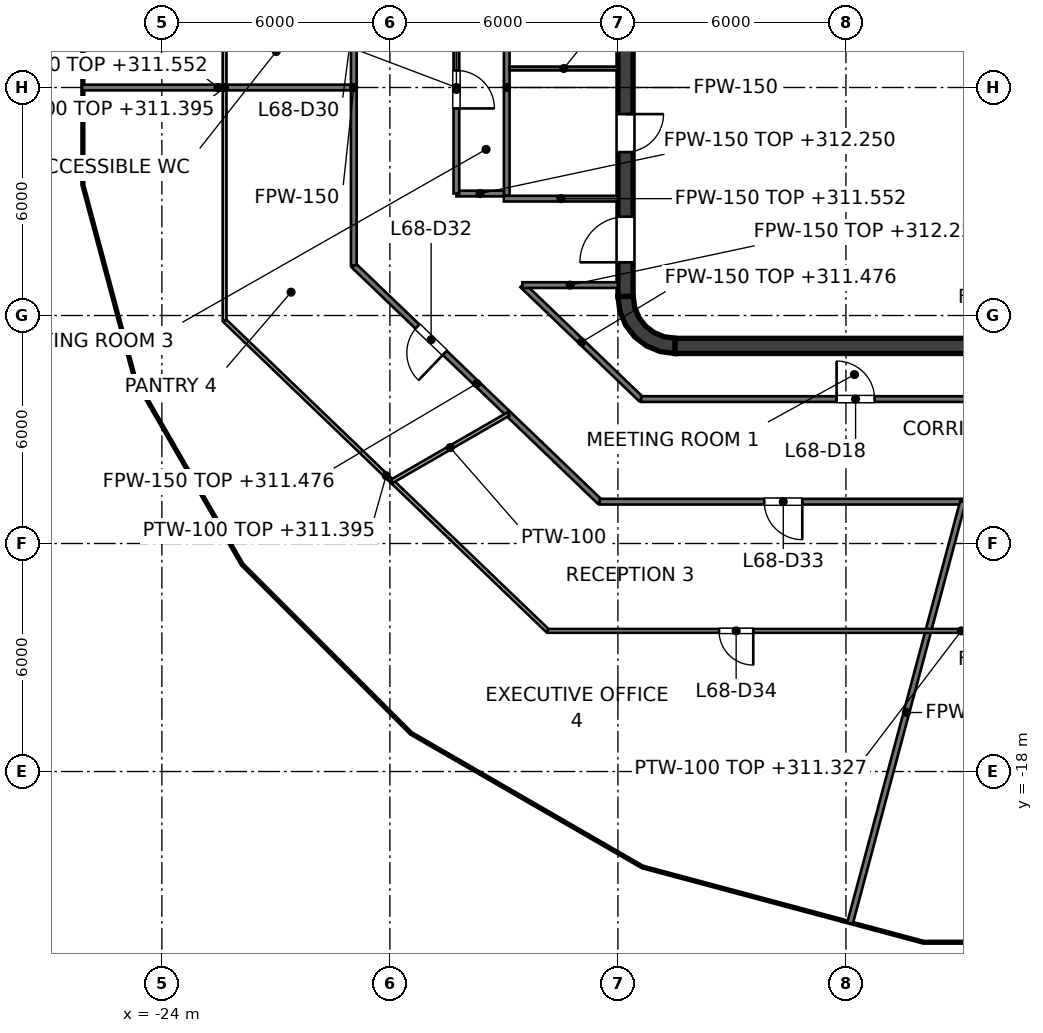
"""IFC4 building model, lengths in metres.
Left out: names, types, materials, properties, quantities, classifications, styles, units other than length and angle.
Written with IfcOpenShell. Run it as: python <this file> out.ifc"""

import sys

from ifc_helpers import new_model, si_unit, direction, frame, frame_2d, origin, place, context, subcontext, project, spatial, polyline, rectangle, outline, extrude, element, fill, save


model = new_model("IFC4")
c1 = context("Model", 3, precision=1e-05, world=origin(), true_north=direction((0.0, 1.0)))
c2 = subcontext(c1, "Body", "Model", "MODEL_VIEW")
j1 = project(units=[si_unit("LENGTHUNIT", "METRE"), si_unit("PLANEANGLEUNIT", "RADIAN")], contexts=[c1])
p1 = place(None, origin())
s1 = spatial("IfcSite", under=j1, at=p1, CompositionType="ELEMENT")
p2 = place(p1, origin())
s2 = spatial("IfcBuilding", under=s1, at=p2, CompositionType="ELEMENT")
p3 = place(p2, frame((0.0, 0.0, 308.4)))
s3 = spatial("IfcBuildingStorey", under=s2, at=p3, CompositionType="ELEMENT", Elevation=308.4)
p4 = place(p3, frame((-10.5, -6.8, 0.0), z_axis=(0.0, 0.0, 1.0), x_axis=(1.0, 0.0, 0.0)))
e1 = element("IfcWall", 1, at=p4, inside=s3, PredefinedType="SHEAR", context=c2, shape_type="SweptSolid", body=[
    extrude(rectangle(XDim=21.0, YDim=0.4, at=frame_2d((10.5, 0.0))), origin(), (0.0, 0.0, 1.0), 4.0),
])
p5 = place(p3, frame((-11.8, -5.5, 0.0), z_axis=(0.0, 0.0, 1.0), x_axis=(0.0, 1.0, 0.0)))
e2 = element("IfcWall", 2, at=p5, inside=s3, PredefinedType="SHEAR", context=c2, shape_type="SweptSolid", body=[
    extrude(rectangle(XDim=11.0, YDim=0.4, at=frame_2d((5.5, 0.0))), origin(), (0.0, 0.0, 1.0), 4.0),
])
p6 = place(p5, frame((3.8, 0.0, 0.0)))
e3 = element("IfcOpeningElement", 3, at=p6, cuts=e2, PredefinedType="OPENING", context=c2, shape_type="SweptSolid", body=[
    extrude(rectangle(XDim=1.0, YDim=2.1, at=frame_2d((0.5, 1.05))), frame((0.0, 0.2, 0.0), z_axis=(0.0, -1.0, 0.0), x_axis=(1.0, 0.0, 0.0)), (0.0, 0.0, 1.0), 0.4),
])
p7 = place(p5, frame((6.7, 0.0, 0.0)))
e4 = element("IfcOpeningElement", 4, at=p7, cuts=e2, PredefinedType="OPENING", context=c2, shape_type="SweptSolid", body=[
    extrude(rectangle(XDim=1.0, YDim=2.1, at=frame_2d((0.5, 1.05))), frame((0.0, 0.2, 0.0), z_axis=(0.0, -1.0, 0.0), x_axis=(1.0, 0.0, 0.0)), (0.0, 0.0, 1.0), 0.4),
])
p8 = place(p5, frame((0.9, 0.0, 0.0)))
e5 = element("IfcOpeningElement", 5, at=p8, cuts=e2, PredefinedType="OPENING", context=c2, shape_type="SweptSolid", body=[
    extrude(rectangle(XDim=1.2, YDim=2.1, at=frame_2d((0.6, 1.05))), frame((0.0, 0.2, 0.0), z_axis=(0.0, -1.0, 0.0), x_axis=(1.0, 0.0, 0.0)), (0.0, 0.0, 1.0), 0.4),
])
p9 = place(p5, frame((8.9, 0.0, 0.0)))
e6 = element("IfcOpeningElement", 6, at=p9, cuts=e2, PredefinedType="OPENING", context=c2, shape_type="SweptSolid", body=[
    extrude(rectangle(XDim=1.2, YDim=2.1, at=frame_2d((0.6, 1.05))), frame((0.0, 0.2, 0.0), z_axis=(0.0, -1.0, 0.0), x_axis=(1.0, 0.0, 0.0)), (0.0, 0.0, 1.0), 0.4),
])
p10 = place(p3, origin())
e7 = element("IfcWall", 7, at=p10, inside=s3, PredefinedType="SHEAR", context=c2, shape_type="SweptSolid", body=[
    extrude(outline(polyline([(-10.5, -7.0), (-10.5, -6.596), (-10.784, -6.559), (-11.048, -6.45), (-11.275, -6.275), (-11.45, -6.048), (-11.559, -5.784), (-11.596, -5.5), (-12.0, -5.5), (-11.949, -5.888), (-11.799, -6.25), (-11.561, -6.561), (-11.25, -6.799), (-10.888, -6.949), (-10.5, -7.0)])), origin(), (0.0, 0.0, 1.0), 4.0),
])
p11 = place(p3, frame((-9.0, -6.6, 0.0), z_axis=(0.0, 0.0, 1.0), x_axis=(0.0, 1.0, 0.0)))
e8 = element("IfcWall", 8, at=p11, inside=s3, PredefinedType="PARTITIONING", context=c2, shape_type="SweptSolid", body=[
    extrude(rectangle(XDim=2.5, YDim=0.25, at=frame_2d((1.25, 0.0))), origin(), (0.0, 0.0, 1.0), 3.85),
])
p12 = place(p11, frame((0.75, 0.0, 0.0)))
e9 = element("IfcOpeningElement", 9, at=p12, cuts=e8, PredefinedType="OPENING", context=c2, shape_type="SweptSolid", body=[
    extrude(rectangle(XDim=1.0, YDim=2.1, at=frame_2d((0.5, 1.05))), frame((0.0, 0.125, 0.0), z_axis=(0.0, -1.0, 0.0), x_axis=(1.0, 0.0, 0.0)), (0.0, 0.0, 1.0), 0.25),
])
p13 = place(p3, frame((-2.9, -6.6, 0.0), z_axis=(0.0, 0.0, 1.0), x_axis=(0.0, 1.0, 0.0)))
e10 = element("IfcWall", 10, at=p13, inside=s3, PredefinedType="PARTITIONING", context=c2, shape_type="SweptSolid", body=[
    extrude(rectangle(XDim=2.5, YDim=0.25, at=frame_2d((1.25, 0.0))), origin(), (0.0, 0.0, 1.0), 3.85),
])
p14 = place(p13, frame((0.8, 0.0, 0.0)))
e11 = element("IfcOpeningElement", 11, at=p14, cuts=e10, PredefinedType="OPENING", context=c2, shape_type="SweptSolid", body=[
    extrude(rectangle(XDim=0.9, YDim=2.1, at=frame_2d((0.45, 1.05))), frame((0.0, 0.125, 0.0), z_axis=(0.0, -1.0, 0.0), x_axis=(1.0, 0.0, 0.0)), (0.0, 0.0, 1.0), 0.25),
])
p15 = place(p3, frame((-9.125, -1.525, 0.0), z_axis=(0.0, 0.0, 1.0), x_axis=(1.0, 0.0, 0.0)))
e12 = element("IfcWall", 12, at=p15, inside=s3, PredefinedType="SOLIDWALL", context=c2, shape_type="SweptSolid", body=[
    extrude(rectangle(XDim=18.25, YDim=0.25, at=frame_2d((9.125, 0.0))), origin(), (0.0, 0.0, 1.0), 3.85),
])
p16 = place(p15, frame((7.15, 0.0, 0.0)))
e13 = element("IfcOpeningElement", 13, at=p16, cuts=e12, PredefinedType="OPENING", context=c2, shape_type="SweptSolid", body=[
    extrude(rectangle(XDim=1.2, YDim=2.1, at=frame_2d((0.6, 1.05))), frame((0.0, 0.125, 0.0), z_axis=(0.0, -1.0, 0.0), x_axis=(1.0, 0.0, 0.0)), (0.0, 0.0, 1.0), 0.25),
])
p17 = place(p15, frame((10.2, 0.0, 0.0)))
e14 = element("IfcOpeningElement", 14, at=p17, cuts=e12, PredefinedType="OPENING", context=c2, shape_type="SweptSolid", body=[
    extrude(rectangle(XDim=1.2, YDim=2.1, at=frame_2d((0.6, 1.05))), frame((0.0, 0.125, 0.0), z_axis=(0.0, -1.0, 0.0), x_axis=(1.0, 0.0, 0.0)), (0.0, 0.0, 1.0), 0.25),
])
p18 = place(p15, frame((16.075, 0.0, 0.0)))
e15 = element("IfcOpeningElement", 15, at=p18, cuts=e12, PredefinedType="OPENING", context=c2, shape_type="SweptSolid", body=[
    extrude(rectangle(XDim=1.0, YDim=2.1, at=frame_2d((0.5, 1.05))), frame((0.0, 0.125, 0.0), z_axis=(0.0, -1.0, 0.0), x_axis=(1.0, 0.0, 0.0)), (0.0, 0.0, 1.0), 0.25),
])
p19 = place(p3, frame((-9.125, -3.975, 0.0), z_axis=(0.0, 0.0, 1.0), x_axis=(1.0, 0.0, 0.0)))
e16 = element("IfcWall", 16, at=p19, inside=s3, PredefinedType="SOLIDWALL", context=c2, shape_type="SweptSolid", body=[
    extrude(rectangle(XDim=12.4, YDim=0.25, at=frame_2d((6.2, 0.0))), origin(), (0.0, 0.0, 1.0), 3.85),
])
p20 = place(p19, frame((1.05, 0.0, 0.0)))
e17 = element("IfcOpeningElement", 17, at=p20, cuts=e16, PredefinedType="OPENING", context=c2, shape_type="SweptSolid", body=[
    extrude(rectangle(XDim=1.2, YDim=2.1, at=frame_2d((0.6, 1.05))), frame((0.0, 0.125, 0.0), z_axis=(0.0, -1.0, 0.0), x_axis=(1.0, 0.0, 0.0)), (0.0, 0.0, 1.0), 0.25),
])
p21 = place(p19, frame((4.1, 0.0, 0.0)))
e18 = element("IfcOpeningElement", 18, at=p21, cuts=e16, PredefinedType="OPENING", context=c2, shape_type="SweptSolid", body=[
    extrude(rectangle(XDim=1.2, YDim=2.1, at=frame_2d((0.6, 1.05))), frame((0.0, 0.125, 0.0), z_axis=(0.0, -1.0, 0.0), x_axis=(1.0, 0.0, 0.0)), (0.0, 0.0, 1.0), 0.25),
])
for number, where, z_axis, x_axis in (
    (19, (-9.0, -3.85, 0.0), (0.0, 0.0, 1.0), (0.0, 1.0, 0.0)),
    (20, (-5.95, -3.85, 0.0), (0.0, 0.0, 1.0), (0.0, 1.0, 0.0)),
    (21, (-2.9, -3.85, 0.0), (0.0, 0.0, 1.0), (0.0, 1.0, 0.0)),
):
    element("IfcWall", number, at=place(p3, frame(where, z_axis=z_axis, x_axis=x_axis)), inside=s3, PredefinedType="SOLIDWALL", context=c2, shape_type="SweptSolid", body=[
        extrude(rectangle(XDim=2.2, YDim=0.25, at=frame_2d((1.1, 0.0))), origin(), (0.0, 0.0, 1.0), 3.85),
    ])
p22 = place(p3, frame((-14.925, -2.85, 0.0), z_axis=(0.0, 0.0, 1.0), x_axis=(0.0, 1.0, 0.0)))
e22 = element("IfcWall", 22, at=p22, inside=s3, PredefinedType="PARTITIONING", context=c2, shape_type="SweptSolid", body=[
    extrude(rectangle(XDim=5.7, YDim=0.15, at=frame_2d((2.85, 0.0))), origin(), (0.0, 0.0, 1.0), 2.995),
])
p23 = place(p3, frame((-15.0, -2.925, 0.0), z_axis=(0.0, 0.0, 1.0), x_axis=(1.0, 0.0, 0.0)))
e23 = element("IfcWall", 23, at=p23, inside=s3, PredefinedType="PARTITIONING", context=c2, shape_type="SweptSolid", body=[
    extrude(rectangle(XDim=3.0, YDim=0.15, at=frame_2d((1.5, 0.0))), origin(), (0.0, 0.0, 1.0), 3.152),
])
p24 = place(p3, frame((-14.85, 0.5, 0.0), z_axis=(0.0, 0.0, 1.0), x_axis=(1.0, 0.0, 0.0)))
e24 = element("IfcWall", 24, at=p24, inside=s3, PredefinedType="PARTITIONING", context=c2, shape_type="SweptSolid", body=[
    extrude(rectangle(XDim=2.85, YDim=0.1, at=frame_2d((1.425, 0.0))), origin(), (0.0, 0.0, 1.0), 3.85),
])
p25 = place(p3, frame((-18.95, -4.683, 0.0), z_axis=(0.0, 0.0, 1.0), x_axis=(0.721259541977, -0.692664906797, 0.0)))
e25 = element("IfcWall", 25, at=p25, inside=s3, PredefinedType="PARTITIONING", context=c2, shape_type="SweptSolid", body=[
    extrude(rectangle(XDim=8.973, YDim=0.15, at=frame_2d((4.487, 0.0))), origin(), (0.0, 0.0, 1.0), 3.076),
])
p26 = place(p25, frame((2.321, 0.0, 0.0)))
e26 = element("IfcOpeningElement", 26, at=p26, cuts=e25, PredefinedType="OPENING", context=c2, shape_type="SweptSolid", body=[
    extrude(rectangle(XDim=1.0, YDim=2.1, at=frame_2d((0.5, 1.05))), frame((0.0, 0.075, 0.0), z_axis=(0.0, -1.0, 0.0), x_axis=(1.0, 0.0, 0.0)), (0.0, 0.0, 1.0), 0.15),
])
p27 = place(p3, frame((-14.514, -5.2, 0.0), z_axis=(0.0, 0.0, 1.0), x_axis=(0.721228427004, -0.692697304803, 0.0)))
e27 = element("IfcWall", 27, at=p27, inside=s3, PredefinedType="PARTITIONING", context=c2, shape_type="SweptSolid", body=[
    extrude(rectangle(XDim=4.33, YDim=0.15, at=frame_2d((2.165, 0.0))), origin(), (0.0, 0.0, 1.0), 3.076),
])
p28 = place(p3, frame((-12.478, -10.899, 0.0), z_axis=(0.0, 0.0, 1.0), x_axis=(1.0, 0.0, 0.0)))
e28 = element("IfcWall", 28, at=p28, inside=s3, PredefinedType="PARTITIONING", context=c2, shape_type="SweptSolid", body=[
    extrude(rectangle(XDim=24.956, YDim=0.15, at=frame_2d((12.478, 0.0))), origin(), (0.0, 0.0, 1.0), 2.927),
])
p29 = place(p28, frame((4.329, 0.0, 0.0)))
e29 = element("IfcOpeningElement", 29, at=p29, cuts=e28, PredefinedType="OPENING", context=c2, shape_type="SweptSolid", body=[
    extrude(rectangle(XDim=1.0, YDim=2.1, at=frame_2d((0.5, 1.05))), frame((0.0, 0.075, 0.0), z_axis=(0.0, -1.0, 0.0), x_axis=(1.0, 0.0, 0.0)), (0.0, 0.0, 1.0), 0.15),
])
p30 = place(p28, frame((11.978, 0.0, 0.0)))
e30 = element("IfcOpeningElement", 30, at=p30, cuts=e28, PredefinedType="OPENING", context=c2, shape_type="SweptSolid", body=[
    extrude(rectangle(XDim=1.0, YDim=2.1, at=frame_2d((0.5, 1.05))), frame((0.0, 0.075, 0.0), z_axis=(0.0, -1.0, 0.0), x_axis=(1.0, 0.0, 0.0)), (0.0, 0.0, 1.0), 0.15),
])
p31 = place(p28, frame((19.627, 0.0, 0.0)))
e31 = element("IfcOpeningElement", 31, at=p31, cuts=e28, PredefinedType="OPENING", context=c2, shape_type="SweptSolid", body=[
    extrude(rectangle(XDim=1.0, YDim=2.1, at=frame_2d((0.5, 1.05))), frame((0.0, 0.075, 0.0), z_axis=(0.0, -1.0, 0.0), x_axis=(1.0, 0.0, 0.0)), (0.0, 0.0, 1.0), 0.15),
])
p32 = place(p3, frame((-11.391, -8.199, 0.0), z_axis=(0.0, 0.0, 1.0), x_axis=(1.0, 0.0, 0.0)))
e32 = element("IfcWall", 32, at=p32, inside=s3, PredefinedType="PARTITIONING", context=c2, shape_type="SweptSolid", body=[
    extrude(rectangle(XDim=22.782, YDim=0.15, at=frame_2d((11.391, 0.0))), origin(), (0.0, 0.0, 1.0), 2.927),
])
p33 = place(p32, frame((5.145, 0.0, 0.0)))
e33 = element("IfcOpeningElement", 33, at=p33, cuts=e32, PredefinedType="OPENING", context=c2, shape_type="SweptSolid", body=[
    extrude(rectangle(XDim=1.0, YDim=2.1, at=frame_2d((0.5, 1.05))), frame((0.0, 0.075, 0.0), z_axis=(0.0, -1.0, 0.0), x_axis=(1.0, 0.0, 0.0)), (0.0, 0.0, 1.0), 0.15),
])
p34 = place(p32, frame((16.536, 0.0, 0.0)))
e34 = element("IfcOpeningElement", 34, at=p34, cuts=e32, PredefinedType="OPENING", context=c2, shape_type="SweptSolid", body=[
    extrude(rectangle(XDim=1.0, YDim=2.1, at=frame_2d((0.5, 1.05))), frame((0.0, 0.075, 0.0), z_axis=(0.0, -1.0, 0.0), x_axis=(1.0, 0.0, 0.0)), (0.0, 0.0, 1.0), 0.15),
])
p35 = place(p3, frame((-14.514, -5.2, 0.0), z_axis=(0.0, 0.0, 1.0), x_axis=(1.0, 0.0, 0.0)))
e35 = element("IfcWall", 35, at=p35, inside=s3, PredefinedType="PARTITIONING", context=c2, shape_type="SweptSolid", body=[
    extrude(rectangle(XDim=2.514, YDim=0.15, at=frame_2d((1.257, 0.0))), origin(), (0.0, 0.0, 1.0), 3.85),
])
p36 = place(p3, frame((-16.25, -2.79, 0.0), z_axis=(0.0, 0.0, 1.0), x_axis=(1.0, 0.0, 0.0)))
e36 = element("IfcWall", 36, at=p36, inside=s3, PredefinedType="PARTITIONING", context=c2, shape_type="SweptSolid", body=[
    extrude(rectangle(XDim=1.25, YDim=0.15, at=frame_2d((0.625, 0.0))), origin(), (0.0, 0.0, 1.0), 3.85),
])
p37 = place(p3, frame((-26.098, 0.0, 0.0), z_axis=(0.0, 0.0, 1.0), x_axis=(1.0, 0.0, 0.0)))
e37 = element("IfcWall", 37, at=p37, inside=s3, PredefinedType="PARTITIONING", context=c2, shape_type="SweptSolid", body=[
    extrude(rectangle(XDim=7.148, YDim=0.15, at=frame_2d((3.574, 0.0))), origin(), (0.0, 0.0, 1.0), 3.152),
])
p38 = place(p3, frame((-5.894, -21.995, 0.0), z_axis=(0.0, 0.0, 1.0), x_axis=(0.25881327894, 0.965927371309, 0.0)))
e38 = element("IfcWall", 38, at=p38, inside=s3, PredefinedType="PARTITIONING", context=c2, shape_type="SweptSolid", body=[
    extrude(rectangle(XDim=11.488, YDim=0.15, at=frame_2d((5.744, 0.0))), origin(), (0.0, 0.0, 1.0), 3.424),
])
p39 = place(p3, frame((-16.25, -2.79, 0.0), z_axis=(0.0, 0.0, 1.0), x_axis=(0.0, 1.0, 0.0)))
e39 = element("IfcWall", 39, at=p39, inside=s3, PredefinedType="PARTITIONING", context=c2, shape_type="SweptSolid", body=[
    extrude(rectangle(XDim=5.58, YDim=0.15, at=frame_2d((2.79, 0.0))), origin(), (0.0, 0.0, 1.0), 2.995),
])
p40 = place(p39, frame((2.239, 0.0, 0.0)))
e40 = element("IfcOpeningElement", 40, at=p40, cuts=e39, PredefinedType="OPENING", context=c2, shape_type="SweptSolid", body=[
    extrude(rectangle(XDim=1.0, YDim=2.1, at=frame_2d((0.5, 1.05))), frame((0.0, 0.075, 0.0), z_axis=(0.0, -1.0, 0.0), x_axis=(1.0, 0.0, 0.0)), (0.0, 0.0, 1.0), 0.15),
])
p41 = place(p3, frame((-18.95, -4.683, 0.0), z_axis=(0.0, 0.0, 1.0), x_axis=(0.0, 1.0, 0.0)))
e41 = element("IfcWall", 41, at=p41, inside=s3, PredefinedType="PARTITIONING", context=c2, shape_type="SweptSolid", body=[
    extrude(rectangle(XDim=9.366, YDim=0.15, at=frame_2d((4.683, 0.0))), origin(), (0.0, 0.0, 1.0), 2.995),
])
p42 = place(p41, frame((6.088, 0.0, 0.0)))
e42 = element("IfcOpeningElement", 42, at=p42, cuts=e41, PredefinedType="OPENING", context=c2, shape_type="SweptSolid", body=[
    extrude(rectangle(XDim=1.0, YDim=2.1, at=frame_2d((0.5, 1.05))), frame((0.0, 0.075, 0.0), z_axis=(0.0, -1.0, 0.0), x_axis=(1.0, 0.0, 0.0)), (0.0, 0.0, 1.0), 0.15),
])
p43 = place(p3, frame((-22.35, -6.132, 0.0), z_axis=(0.0, 0.0, 1.0), x_axis=(0.72117874289, -0.692749031615, 0.0)))
e43 = element("IfcWall", 43, at=p43, inside=s3, PredefinedType="PARTITIONING", context=c2, shape_type="SweptSolid", body=[
    extrude(rectangle(XDim=11.791, YDim=0.1, at=frame_2d((5.896, 0.0))), origin(), (0.0, 0.0, 1.0), 2.995),
])
p44 = place(p3, frame((-13.846, -14.299, 0.0), z_axis=(0.0, 0.0, 1.0), x_axis=(1.0, 0.0, 0.0)))
e44 = element("IfcWall", 44, at=p44, inside=s3, PredefinedType="PARTITIONING", context=c2, shape_type="SweptSolid", body=[
    extrude(rectangle(XDim=21.762, YDim=0.1, at=frame_2d((10.881, 0.0))), origin(), (0.0, 0.0, 1.0), 2.927),
])
p45 = place(p44, frame((4.507, 0.0, 0.0)))
e45 = element("IfcOpeningElement", 45, at=p45, cuts=e44, PredefinedType="OPENING", context=c2, shape_type="SweptSolid", body=[
    extrude(rectangle(XDim=0.9, YDim=2.1, at=frame_2d((0.45, 1.05))), frame((0.0, 0.05, 0.0), z_axis=(0.0, -1.0, 0.0), x_axis=(1.0, 0.0, 0.0)), (0.0, 0.0, 1.0), 0.1),
])
p46 = place(p44, frame((19.217, 0.0, 0.0)))
e46 = element("IfcOpeningElement", 46, at=p46, cuts=e44, PredefinedType="OPENING", context=c2, shape_type="SweptSolid", body=[
    extrude(rectangle(XDim=0.9, YDim=2.1, at=frame_2d((0.45, 1.05))), frame((0.0, 0.05, 0.0), z_axis=(0.0, -1.0, 0.0), x_axis=(1.0, 0.0, 0.0)), (0.0, 0.0, 1.0), 0.1),
])
p47 = place(p3, frame((-17.946, -10.361, 0.0), z_axis=(0.0, 0.0, 1.0), x_axis=(0.865967311171, 0.500100605862, 0.0)))
e47 = element("IfcWall", 47, at=p47, inside=s3, PredefinedType="PARTITIONING", context=c2, shape_type="SweptSolid", body=[
    extrude(rectangle(XDim=3.539, YDim=0.1, at=frame_2d((1.77, 0.0))), origin(), (0.0, 0.0, 1.0), 3.85),
])
p48 = place(p3, frame((-22.35, -6.132, 0.0), z_axis=(0.0, 0.0, 1.0), x_axis=(0.0, 1.0, 0.0)))
e48 = element("IfcWall", 48, at=p48, inside=s3, PredefinedType="PARTITIONING", context=c2, shape_type="SweptSolid", body=[
    extrude(rectangle(XDim=12.264, YDim=0.1, at=frame_2d((6.132, 0.0))), origin(), (0.0, 0.0, 1.0), 2.995),
])
p49 = place(p20, origin())
e49 = element("IfcDoor", 49, at=p49, inside=s3, OperationType="DOUBLE_DOOR_SLIDING", PredefinedType="DOOR", context=c2, shape_type="SweptSolid", body=[
    extrude(rectangle(XDim=1.2, YDim=2.1, at=frame_2d((0.6, 1.05))), frame((0.0, 0.025, 0.0), z_axis=(0.0, -1.0, 0.0), x_axis=(1.0, 0.0, 0.0)), (0.0, 0.0, 1.0), 0.05),
])
fill(e17, e49)
p50 = place(p21, origin())
e50 = element("IfcDoor", 50, at=p50, inside=s3, OperationType="DOUBLE_DOOR_SLIDING", PredefinedType="DOOR", context=c2, shape_type="SweptSolid", body=[
    extrude(rectangle(XDim=1.2, YDim=2.1, at=frame_2d((0.6, 1.05))), frame((0.0, 0.025, 0.0), z_axis=(0.0, -1.0, 0.0), x_axis=(1.0, 0.0, 0.0)), (0.0, 0.0, 1.0), 0.05),
])
fill(e18, e50)
p51 = place(p12, origin())
e51 = element("IfcDoor", 51, at=p51, inside=s3, OperationType="SINGLE_SWING_LEFT", PredefinedType="DOOR", context=c2, shape_type="SweptSolid", body=[
    extrude(rectangle(XDim=1.0, YDim=2.1, at=frame_2d((0.5, 1.05))), frame((0.0, 0.025, 0.0), z_axis=(0.0, -1.0, 0.0), x_axis=(1.0, 0.0, 0.0)), (0.0, 0.0, 1.0), 0.05),
])
fill(e9, e51)
p52 = place(p14, origin())
e52 = element("IfcDoor", 52, at=p52, inside=s3, OperationType="SINGLE_SWING_RIGHT", PredefinedType="DOOR", context=c2, shape_type="SweptSolid", body=[
    extrude(rectangle(XDim=0.9, YDim=2.1, at=frame_2d((0.45, 1.05))), frame((0.0, 0.025, 0.0), z_axis=(0.0, -1.0, 0.0), x_axis=(1.0, 0.0, 0.0)), (0.0, 0.0, 1.0), 0.05),
])
fill(e11, e52)
p53 = place(p6, origin())
e53 = element("IfcDoor", 53, at=p53, inside=s3, OperationType="SINGLE_SWING_RIGHT", PredefinedType="DOOR", context=c2, shape_type="SweptSolid", body=[
    extrude(rectangle(XDim=1.0, YDim=2.1, at=frame_2d((0.5, 1.05))), frame((0.0, 0.025, 0.0), z_axis=(0.0, -1.0, 0.0), x_axis=(1.0, 0.0, 0.0)), (0.0, 0.0, 1.0), 0.05),
])
fill(e3, e53)
p54 = place(p8, origin())
e54 = element("IfcDoor", 54, at=p54, inside=s3, OperationType="SINGLE_SWING_LEFT", PredefinedType="DOOR", context=c2, shape_type="SweptSolid", body=[
    extrude(rectangle(XDim=1.2, YDim=2.1, at=frame_2d((0.6, 1.05))), frame((0.0, 0.025, 0.0), z_axis=(0.0, -1.0, 0.0), x_axis=(1.0, 0.0, 0.0)), (0.0, 0.0, 1.0), 0.05),
])
fill(e5, e54)
p55 = place(p33, origin())
e55 = element("IfcDoor", 55, at=p55, inside=s3, OperationType="SINGLE_SWING_LEFT", PredefinedType="DOOR", context=c2, shape_type="SweptSolid", body=[
    extrude(rectangle(XDim=1.0, YDim=2.1, at=frame_2d((0.5, 1.05))), frame((0.0, 0.025, 0.0), z_axis=(0.0, -1.0, 0.0), x_axis=(1.0, 0.0, 0.0)), (0.0, 0.0, 1.0), 0.05),
])
fill(e33, e55)
p56 = place(p40, origin())
e56 = element("IfcDoor", 56, at=p56, inside=s3, OperationType="SINGLE_SWING_LEFT", PredefinedType="DOOR", context=c2, shape_type="SweptSolid", body=[
    extrude(rectangle(XDim=1.0, YDim=2.1, at=frame_2d((0.5, 1.05))), frame((0.0, 0.025, 0.0), z_axis=(0.0, -1.0, 0.0), x_axis=(1.0, 0.0, 0.0)), (0.0, 0.0, 1.0), 0.05),
])
fill(e40, e56)
p57 = place(p26, origin())
e57 = element("IfcDoor", 57, at=p57, inside=s3, OperationType="SINGLE_SWING_RIGHT", PredefinedType="DOOR", context=c2, shape_type="SweptSolid", body=[
    extrude(rectangle(XDim=1.0, YDim=2.1, at=frame_2d((0.5, 1.05))), frame((0.0, 0.025, 0.0), z_axis=(0.0, -1.0, 0.0), x_axis=(1.0, 0.0, 0.0)), (0.0, 0.0, 1.0), 0.05),
])
fill(e26, e57)
p58 = place(p29, origin())
e58 = element("IfcDoor", 58, at=p58, inside=s3, OperationType="SINGLE_SWING_RIGHT", PredefinedType="DOOR", context=c2, shape_type="SweptSolid", body=[
    extrude(rectangle(XDim=1.0, YDim=2.1, at=frame_2d((0.5, 1.05))), frame((0.0, 0.025, 0.0), z_axis=(0.0, -1.0, 0.0), x_axis=(1.0, 0.0, 0.0)), (0.0, 0.0, 1.0), 0.05),
])
fill(e29, e58)
p59 = place(p45, origin())
e59 = element("IfcDoor", 59, at=p59, inside=s3, OperationType="SINGLE_SWING_RIGHT", PredefinedType="DOOR", context=c2, shape_type="SweptSolid", body=[
    extrude(rectangle(XDim=0.9, YDim=2.1, at=frame_2d((0.45, 1.05))), frame((0.0, 0.025, 0.0), z_axis=(0.0, -1.0, 0.0), x_axis=(1.0, 0.0, 0.0)), (0.0, 0.0, 1.0), 0.05),
])
fill(e45, e59)
save(model, sys.argv[1])
